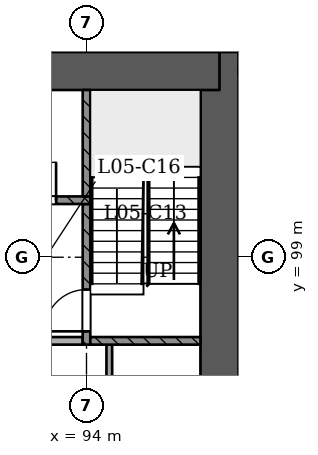
"""IFC4 building model, lengths in metres.
Left out: names, types, materials, properties, quantities, classifications, styles, units other than length and angle.
Written with IfcOpenShell. Run it as: python <this file> out.ifc"""

import sys

from ifc_helpers import new_model, si_unit, direction, frame, frame_2d, origin, place, context, subcontext, project, spatial, rectangle, extrude, element, fill, save


model = new_model("IFC4")
c1 = context("Model", 3, precision=1e-05, world=origin(), true_north=direction((0.0, 1.0)))
c2 = subcontext(c1, "Body", "Model", "MODEL_VIEW")
j1 = project(units=[si_unit("LENGTHUNIT", "METRE"), si_unit("PLANEANGLEUNIT", "RADIAN")], contexts=[c1])
p1 = place(None, origin())
s1 = spatial("IfcSite", under=j1, at=p1, CompositionType="ELEMENT")
p2 = place(p1, origin())
s2 = spatial("IfcBuilding", under=s1, at=p2, CompositionType="ELEMENT")
p3 = place(p2, frame((0.0, 0.0, 27.0)))
s3 = spatial("IfcBuildingStorey", under=s2, at=p3, CompositionType="ELEMENT", Elevation=27.0)
p4 = place(p3, frame((97.5, 92.9, 0.0), z_axis=(0.0, 0.0, 1.0), x_axis=(0.0, 1.0, 0.0)))
e1 = element("IfcWall", 1, at=p4, inside=s3, PredefinedType="SHEAR", context=c2, shape_type="SweptSolid", body=[
    extrude(rectangle(XDim=11.5, YDim=1.0, at=frame_2d((5.75, 0.0))), origin(), (0.0, 0.0, 1.0), 3.6),
])
p5 = place(p3, frame((97.5, 103.9, 0.0), z_axis=(0.0, 0.0, 1.0), x_axis=(-1.0, 0.0, 0.0)))
e2 = element("IfcWall", 2, at=p5, inside=s3, PredefinedType="SHEAR", context=c2, shape_type="SweptSolid", body=[
    extrude(rectangle(XDim=25.5, YDim=1.0, at=frame_2d((12.75, 0.0))), origin(), (0.0, 0.0, 1.0), 3.6),
])
p6 = place(p3, frame((94.6, 93.4, 0.0), z_axis=(0.0, 0.0, 1.0), x_axis=(0.0, 1.0, 0.0)))
e3 = element("IfcWall", 3, at=p6, inside=s3, PredefinedType="PARTITIONING", context=c2, shape_type="SweptSolid", body=[
    extrude(rectangle(XDim=3.3, YDim=0.15, at=frame_2d((1.65, 0.0))), origin(), (0.0, 0.0, 1.0), 3.1),
])
p7 = place(p3, frame((91.5, 96.8, 0.0), z_axis=(0.0, 0.0, 1.0), x_axis=(1.0, 0.0, 0.0)))
e4 = element("IfcWall", 4, at=p7, inside=s3, PredefinedType="PARTITIONING", context=c2, shape_type="SweptSolid", body=[
    extrude(rectangle(XDim=2.4, YDim=0.2, at=frame_2d((1.2, 0.0))), origin(), (0.0, 0.0, 1.0), 3.1),
])
p8 = place(p3, frame((94.0, 96.7, 0.0), z_axis=(0.0, 0.0, 1.0), x_axis=(0.0, 1.0, 0.0)))
e5 = element("IfcWall", 5, at=p8, inside=s3, PredefinedType="SOLIDWALL", context=c2, shape_type="SweptSolid", body=[
    extrude(rectangle(XDim=3.7, YDim=0.2, at=frame_2d((1.85, 0.0))), origin(), (0.0, 0.0, 1.0), 3.1),
])
p9 = place(p8, frame((0.35, 0.0, 0.0)))
e6 = element("IfcOpeningElement", 6, at=p9, cuts=e5, PredefinedType="OPENING", context=c2, shape_type="SweptSolid", body=[
    extrude(rectangle(XDim=1.1, YDim=2.1, at=frame_2d((0.55, 1.05))), frame((0.0, 0.11, 0.0), z_axis=(0.0, -1.0, 0.0), x_axis=(1.0, 0.0, 0.0)), (0.0, 0.0, 1.0), 0.221),
])
p10 = place(p3, frame((94.1, 96.8, 0.0), z_axis=(0.0, 0.0, 1.0), x_axis=(1.0, 0.0, 0.0)))
e7 = element("IfcWall", 7, at=p10, inside=s3, PredefinedType="SOLIDWALL", context=c2, shape_type="SweptSolid", body=[
    extrude(rectangle(XDim=2.9, YDim=0.2, at=frame_2d((1.45, 0.0))), origin(), (0.0, 0.0, 1.0), 3.1),
])
p11 = place(p3, frame((75.9, 100.5, 0.0), z_axis=(0.0, 0.0, 1.0), x_axis=(1.0, 0.0, 0.0)))
e8 = element("IfcWall", 8, at=p11, inside=s3, PredefinedType="SOLIDWALL", context=c2, shape_type="SweptSolid", body=[
    extrude(rectangle(XDim=18.2, YDim=0.2, at=frame_2d((9.1, 0.0))), origin(), (0.0, 0.0, 1.0), 3.1),
])
p12 = place(p11, frame((2.6, 0.0, 0.0)))
e9 = element("IfcOpeningElement", 9, at=p12, cuts=e8, PredefinedType="OPENING", context=c2, shape_type="SweptSolid", body=[
    extrude(rectangle(XDim=1.1, YDim=2.1, at=frame_2d((0.55, 1.05))), frame((0.0, 0.11, 0.0), z_axis=(0.0, -1.0, 0.0), x_axis=(1.0, 0.0, 0.0)), (0.0, 0.0, 1.0), 0.221),
])
p13 = place(p11, frame((4.5, 0.0, 0.0)))
e10 = element("IfcOpeningElement", 10, at=p13, cuts=e8, PredefinedType="OPENING", context=c2, shape_type="SweptSolid", body=[
    extrude(rectangle(XDim=1.1, YDim=2.1, at=frame_2d((0.55, 1.05))), frame((0.0, 0.11, 0.0), z_axis=(0.0, -1.0, 0.0), x_axis=(1.0, 0.0, 0.0)), (0.0, 0.0, 1.0), 0.221),
])
p14 = place(p11, frame((6.4, 0.0, 0.0)))
e11 = element("IfcOpeningElement", 11, at=p14, cuts=e8, PredefinedType="OPENING", context=c2, shape_type="SweptSolid", body=[
    extrude(rectangle(XDim=1.1, YDim=2.1, at=frame_2d((0.55, 1.05))), frame((0.0, 0.11, 0.0), z_axis=(0.0, -1.0, 0.0), x_axis=(1.0, 0.0, 0.0)), (0.0, 0.0, 1.0), 0.221),
])
p15 = place(p11, frame((8.3, 0.0, 0.0)))
e12 = element("IfcOpeningElement", 12, at=p15, cuts=e8, PredefinedType="OPENING", context=c2, shape_type="SweptSolid", body=[
    extrude(rectangle(XDim=1.1, YDim=2.1, at=frame_2d((0.55, 1.05))), frame((0.0, 0.11, 0.0), z_axis=(0.0, -1.0, 0.0), x_axis=(1.0, 0.0, 0.0)), (0.0, 0.0, 1.0), 0.221),
])
p16 = place(p11, frame((10.2, 0.0, 0.0)))
e13 = element("IfcOpeningElement", 13, at=p16, cuts=e8, PredefinedType="OPENING", context=c2, shape_type="SweptSolid", body=[
    extrude(rectangle(XDim=1.1, YDim=2.1, at=frame_2d((0.55, 1.05))), frame((0.0, 0.11, 0.0), z_axis=(0.0, -1.0, 0.0), x_axis=(1.0, 0.0, 0.0)), (0.0, 0.0, 1.0), 0.221),
])
p17 = place(p11, frame((12.1, 0.0, 0.0)))
e14 = element("IfcOpeningElement", 14, at=p17, cuts=e8, PredefinedType="OPENING", context=c2, shape_type="SweptSolid", body=[
    extrude(rectangle(XDim=1.1, YDim=2.1, at=frame_2d((0.55, 1.05))), frame((0.0, 0.11, 0.0), z_axis=(0.0, -1.0, 0.0), x_axis=(1.0, 0.0, 0.0)), (0.0, 0.0, 1.0), 0.221),
])
p18 = place(p11, frame((14.0, 0.0, 0.0)))
e15 = element("IfcOpeningElement", 15, at=p18, cuts=e8, PredefinedType="OPENING", context=c2, shape_type="SweptSolid", body=[
    extrude(rectangle(XDim=1.1, YDim=2.1, at=frame_2d((0.55, 1.05))), frame((0.0, 0.11, 0.0), z_axis=(0.0, -1.0, 0.0), x_axis=(1.0, 0.0, 0.0)), (0.0, 0.0, 1.0), 0.221),
])
p19 = place(p11, frame((0.65, 0.0, 0.0)))
e16 = element("IfcOpeningElement", 16, at=p19, cuts=e8, PredefinedType="OPENING", context=c2, shape_type="SweptSolid", body=[
    extrude(rectangle(XDim=1.0, YDim=2.1, at=frame_2d((0.5, 1.05))), frame((0.0, 0.11, 0.0), z_axis=(0.0, -1.0, 0.0), x_axis=(1.0, 0.0, 0.0)), (0.0, 0.0, 1.0), 0.221),
])
p20 = place(p11, frame((16.3, 0.0, 0.0)))
e17 = element("IfcOpeningElement", 17, at=p20, cuts=e8, PredefinedType="OPENING", context=c2, shape_type="SweptSolid", body=[
    extrude(rectangle(XDim=1.0, YDim=2.1, at=frame_2d((0.5, 1.05))), frame((0.0, 0.11, 0.0), z_axis=(0.0, -1.0, 0.0), x_axis=(1.0, 0.0, 0.0)), (0.0, 0.0, 1.0), 0.221),
])
p21 = place(p3, frame((94.0, 100.6, 0.0), z_axis=(0.0, 0.0, 1.0), x_axis=(0.0, 1.0, 0.0)))
e18 = element("IfcWall", 18, at=p21, inside=s3, PredefinedType="SOLIDWALL", context=c2, shape_type="SweptSolid", body=[
    extrude(rectangle(XDim=2.8, YDim=0.2, at=frame_2d((1.4, 0.0))), origin(), (0.0, 0.0, 1.0), 3.1),
])
p22 = place(p9, origin())
e19 = element("IfcDoor", 19, at=p22, inside=s3, OperationType="SINGLE_SWING_LEFT", PredefinedType="NOTDEFINED", context=c2, shape_type="SweptSolid", body=[
    extrude(rectangle(XDim=1.1, YDim=2.1, at=frame_2d((0.55, 1.05))), frame((0.0, 0.025, 0.0), z_axis=(0.0, -1.0, 0.0), x_axis=(1.0, 0.0, 0.0)), (0.0, 0.0, 1.0), 0.05),
])
fill(e6, e19)
p23 = place(p20, origin())
e20 = element("IfcDoor", 20, at=p23, inside=s3, OperationType="SINGLE_SWING_RIGHT", PredefinedType="NOTDEFINED", context=c2, shape_type="SweptSolid", body=[
    extrude(rectangle(XDim=1.0, YDim=2.1, at=frame_2d((0.5, 1.05))), frame((0.0, 0.025, 0.0), z_axis=(0.0, -1.0, 0.0), x_axis=(1.0, 0.0, 0.0)), (0.0, 0.0, 1.0), 0.05),
])
fill(e17, e20)
save(model, sys.argv[1])
